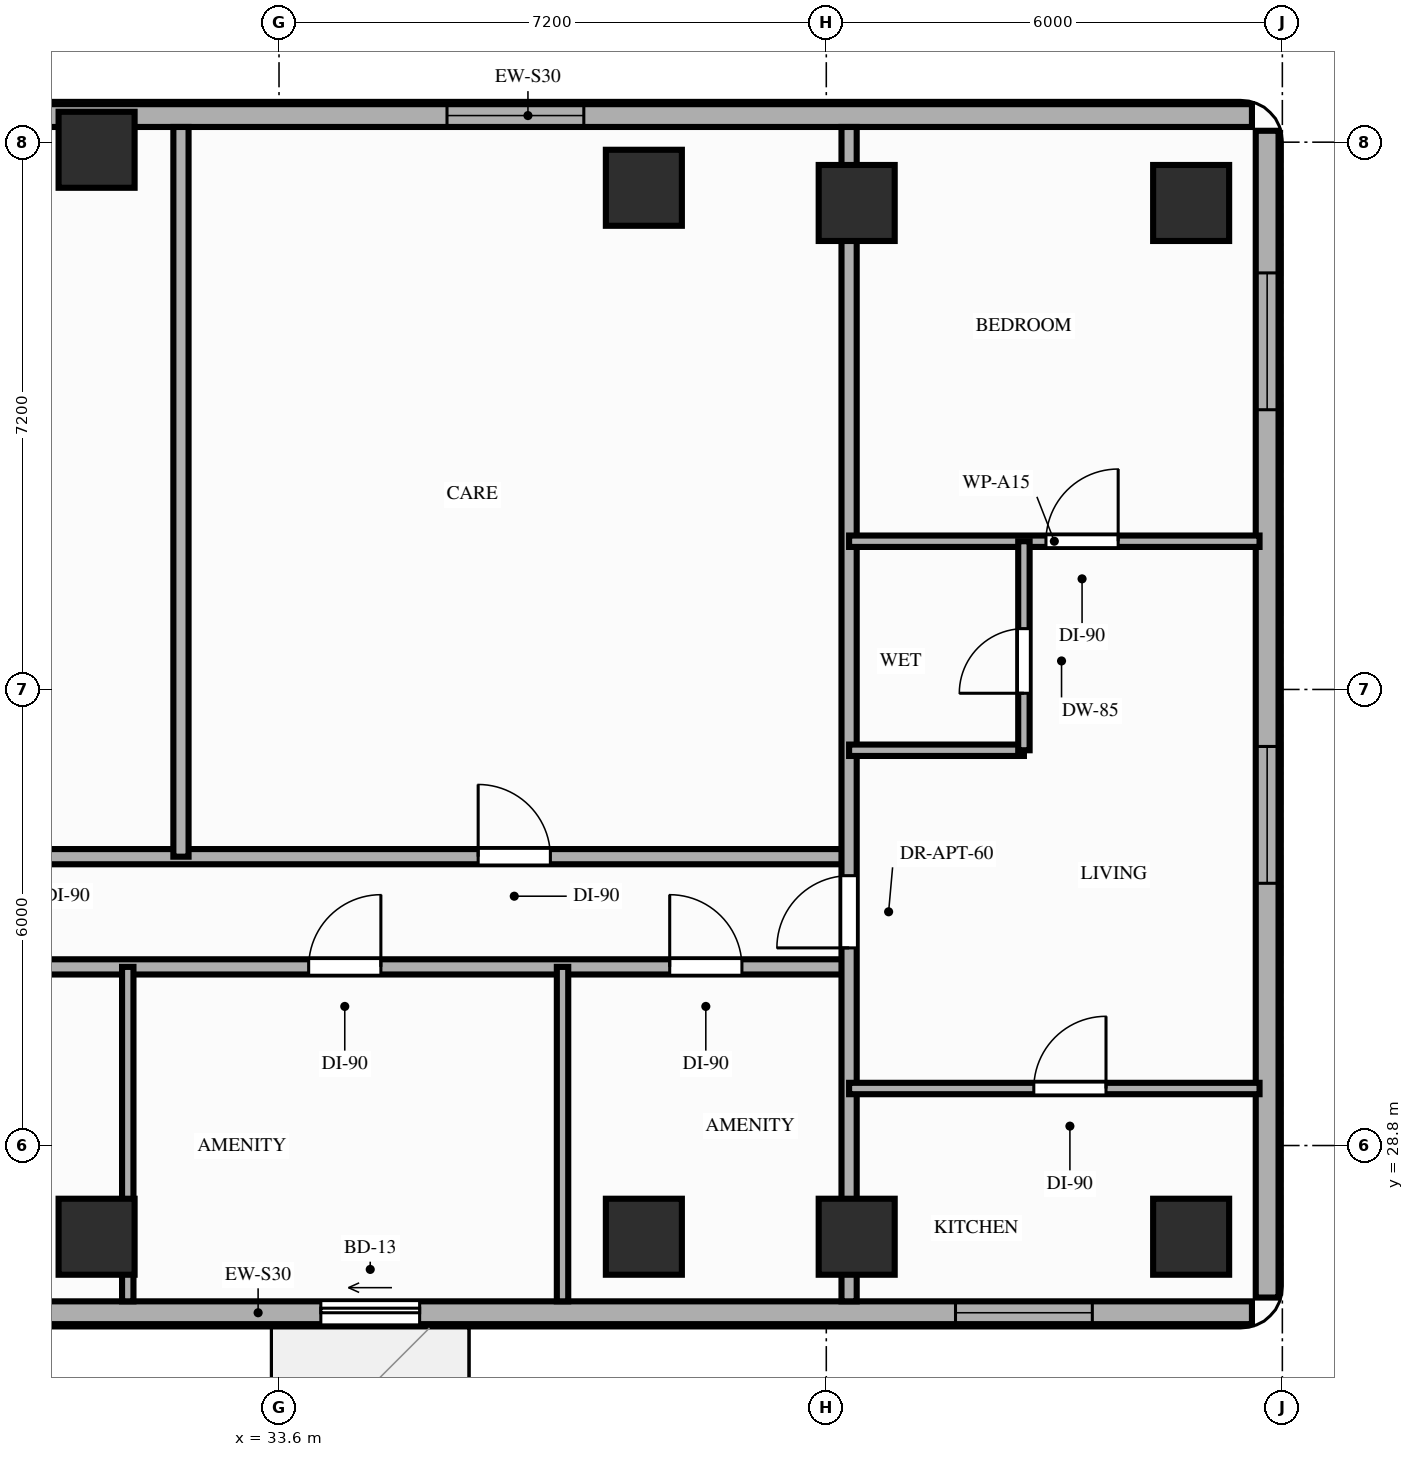
"""IFC4 building model, lengths in metres.
Left out: names, types, materials, properties, quantities, classifications, styles, units other than length and angle.
Written with IfcOpenShell. Run it as: python <this file> out.ifc"""

import sys

from ifc_helpers import new_model, si_unit, direction, frame, frame_2d, origin, origin_2d, place, context, subcontext, project, spatial, rectangle, extrude, element, fill, save


model = new_model("IFC4")
c1 = context("Model", 3, precision=1e-05, world=origin(), true_north=direction((0.0, 1.0)))
c2 = subcontext(c1, "Body", "Model", "MODEL_VIEW")
j1 = project(units=[si_unit("LENGTHUNIT", "METRE"), si_unit("PLANEANGLEUNIT", "RADIAN")], contexts=[c1])
p1 = place(None, origin())
s1 = spatial("IfcSite", under=j1, at=p1, CompositionType="ELEMENT")
p2 = place(p1, origin())
s2 = spatial("IfcBuilding", under=s1, at=p2, CompositionType="ELEMENT")
p3 = place(p2, frame((0.0, 0.0, 123.4)))
s3 = spatial("IfcBuildingStorey", under=s2, at=p3, CompositionType="ELEMENT", Elevation=123.4)
for number, where, z_axis, x_axis in (
    (1, (31.2, 27.6, 0.0), (0.0, 0.0, 1.0), (1.0, 0.0, 0.0)),
    (2, (31.2, 41.9, 0.0), (0.0, 0.0, 1.0), (1.0, 0.0, 0.0)),
    (3, (38.4, 27.6, 0.0), (0.0, 0.0, 1.0), (1.0, 0.0, 0.0)),
    (4, (38.4, 41.4, 0.0), (0.0, 0.0, 1.0), (1.0, 0.0, 0.0)),
    (5, (41.2, 27.6, 0.0), (0.0, 0.0, 1.0), (1.0, 0.0, 0.0)),
    (6, (41.2, 41.2, 0.0), (0.0, 0.0, 1.0), (1.0, 0.0, 0.0)),
    (7, (45.6, 27.6, 0.0), (0.0, 0.0, 1.0), (1.0, 0.0, 0.0)),
    (8, (45.6, 41.2, 0.0), (0.0, 0.0, 1.0), (1.0, 0.0, 0.0)),
):
    element("IfcColumn", number, at=place(p3, frame(where, z_axis=z_axis, x_axis=x_axis)), inside=s3, PredefinedType="COLUMN", context=c2, shape_type="SweptSolid", body=[
        extrude(rectangle(XDim=1.0, YDim=1.0, at=origin_2d()), origin(), (0.0, 0.0, 1.0), 3.2),
    ])
p4 = place(p3, frame((46.4, 42.35, 0.0), z_axis=(0.0, 0.0, 1.0), x_axis=(-1.0, 0.0, 0.0)))
e9 = element("IfcWall", 9, at=p4, inside=s3, PredefinedType="STANDARD", context=c2, shape_type="SweptSolid", body=[
    extrude(rectangle(XDim=19.05, YDim=0.3, at=frame_2d((9.525, 0.0))), origin(), (0.0, 0.0, 1.0), 2.45),
])
p5 = place(p4, frame((8.79, 0.0, 0.85)))
e10 = element("IfcOpeningElement", 10, at=p5, cuts=e9, PredefinedType="OPENING", context=c2, shape_type="SweptSolid", body=[
    extrude(rectangle(XDim=1.8, YDim=1.35, at=frame_2d((0.9, 0.675))), frame((0.0, 0.16, 0.0), z_axis=(0.0, -1.0, 0.0), x_axis=(1.0, 0.0, 0.0)), (0.0, 0.0, 1.0), 0.32),
])
p6 = place(p3, frame((20.25, 26.6, 0.0), z_axis=(0.0, 0.0, 1.0), x_axis=(1.0, 0.0, 0.0)))
e11 = element("IfcWall", 11, at=p6, inside=s3, PredefinedType="STANDARD", context=c2, shape_type="SweptSolid", body=[
    extrude(rectangle(XDim=26.15, YDim=0.3, at=frame_2d((13.075, 0.0))), origin(), (0.0, 0.0, 1.0), 2.71),
])
p7 = place(p6, frame((13.9, 0.0, 0.0)))
e12 = element("IfcOpeningElement", 12, at=p7, cuts=e11, PredefinedType="OPENING", context=c2, shape_type="SweptSolid", body=[
    extrude(rectangle(XDim=1.3, YDim=2.08, at=frame_2d((0.65, 1.04))), frame((0.0, 0.16, 0.0), z_axis=(0.0, -1.0, 0.0), x_axis=(1.0, 0.0, 0.0)), (0.0, 0.0, 1.0), 0.32),
])
p8 = place(p6, frame((2.25, 0.0, 0.85)))
e13 = element("IfcOpeningElement", 13, at=p8, cuts=e11, PredefinedType="OPENING", context=c2, shape_type="SweptSolid", body=[
    extrude(rectangle(XDim=1.8, YDim=1.61, at=frame_2d((0.9, 0.805))), frame((0.0, 0.16, 0.0), z_axis=(0.0, -1.0, 0.0), x_axis=(1.0, 0.0, 0.0)), (0.0, 0.0, 1.0), 0.32),
])
p9 = place(p6, frame((7.75, 0.0, 0.85)))
e14 = element("IfcOpeningElement", 14, at=p9, cuts=e11, PredefinedType="OPENING", context=c2, shape_type="SweptSolid", body=[
    extrude(rectangle(XDim=1.8, YDim=1.61, at=frame_2d((0.9, 0.805))), frame((0.0, 0.16, 0.0), z_axis=(0.0, -1.0, 0.0), x_axis=(1.0, 0.0, 0.0)), (0.0, 0.0, 1.0), 0.32),
])
p10 = place(p6, frame((22.25, 0.0, 0.85)))
e15 = element("IfcOpeningElement", 15, at=p10, cuts=e11, PredefinedType="OPENING", context=c2, shape_type="SweptSolid", body=[
    extrude(rectangle(XDim=1.8, YDim=1.61, at=frame_2d((0.9, 0.805))), frame((0.0, 0.16, 0.0), z_axis=(0.0, -1.0, 0.0), x_axis=(1.0, 0.0, 0.0)), (0.0, 0.0, 1.0), 0.32),
])
p11 = place(p3, frame((46.6, 26.8, 0.0), z_axis=(0.0, 0.0, 1.0), x_axis=(0.0, 1.0, 0.0)))
e16 = element("IfcWall", 16, at=p11, inside=s3, PredefinedType="STANDARD", context=c2, shape_type="SweptSolid", body=[
    extrude(rectangle(XDim=15.35, YDim=0.3, at=frame_2d((7.675, 0.0))), origin(), (0.0, 0.0, 1.0), 3.02),
])
p12 = place(p11, frame((5.45, 0.0, 0.85)))
e17 = element("IfcOpeningElement", 17, at=p12, cuts=e16, PredefinedType="OPENING", context=c2, shape_type="SweptSolid", body=[
    extrude(rectangle(XDim=1.8, YDim=1.75, at=frame_2d((0.9, 0.875))), frame((0.0, 0.16, 0.0), z_axis=(0.0, -1.0, 0.0), x_axis=(1.0, 0.0, 0.0)), (0.0, 0.0, 1.0), 0.32),
])
p13 = place(p11, frame((11.68, 0.0, 0.85)))
e18 = element("IfcOpeningElement", 18, at=p13, cuts=e16, PredefinedType="OPENING", context=c2, shape_type="SweptSolid", body=[
    extrude(rectangle(XDim=1.8, YDim=1.75, at=frame_2d((0.9, 0.875))), frame((0.0, 0.16, 0.0), z_axis=(0.0, -1.0, 0.0), x_axis=(1.0, 0.0, 0.0)), (0.0, 0.0, 1.0), 0.32),
])
p14 = place(p3, frame((27.15, 31.15, 0.0), z_axis=(0.0, 0.0, 1.0), x_axis=(1.0, 0.0, 0.0)))
e19 = element("IfcWall", 19, at=p14, inside=s3, PredefinedType="PARTITIONING", context=c2, shape_type="SweptSolid", body=[
    extrude(rectangle(XDim=13.95, YDim=0.2, at=frame_2d((6.975, 0.0))), origin(), (0.0, 0.0, 1.0), 2.45),
])
p15 = place(p14, frame((1.75, 0.0, 0.0)))
e20 = element("IfcOpeningElement", 20, at=p15, cuts=e19, PredefinedType="OPENING", context=c2, shape_type="SweptSolid", body=[
    extrude(rectangle(XDim=0.95, YDim=2.15, at=frame_2d((0.475, 1.075))), frame((0.0, 0.11, 0.0), z_axis=(0.0, -1.0, 0.0), x_axis=(1.0, 0.0, 0.0)), (0.0, 0.0, 1.0), 0.22),
])
p16 = place(p14, frame((6.84, 0.0, 0.0)))
e21 = element("IfcOpeningElement", 21, at=p16, cuts=e19, PredefinedType="OPENING", context=c2, shape_type="SweptSolid", body=[
    extrude(rectangle(XDim=0.95, YDim=2.15, at=frame_2d((0.475, 1.075))), frame((0.0, 0.11, 0.0), z_axis=(0.0, -1.0, 0.0), x_axis=(1.0, 0.0, 0.0)), (0.0, 0.0, 1.0), 0.22),
])
p17 = place(p14, frame((11.59, 0.0, 0.0)))
e22 = element("IfcOpeningElement", 22, at=p17, cuts=e19, PredefinedType="OPENING", context=c2, shape_type="SweptSolid", body=[
    extrude(rectangle(XDim=0.95, YDim=2.15, at=frame_2d((0.475, 1.075))), frame((0.0, 0.11, 0.0), z_axis=(0.0, -1.0, 0.0), x_axis=(1.0, 0.0, 0.0)), (0.0, 0.0, 1.0), 0.22),
])
p18 = place(p3, frame((27.15, 32.6, 0.0), z_axis=(0.0, 0.0, 1.0), x_axis=(1.0, 0.0, 0.0)))
e23 = element("IfcWall", 23, at=p18, inside=s3, PredefinedType="PARTITIONING", context=c2, shape_type="SweptSolid", body=[
    extrude(rectangle(XDim=13.95, YDim=0.2, at=frame_2d((6.975, 0.0))), origin(), (0.0, 0.0, 1.0), 2.45),
])
p19 = place(p18, frame((2.1, 0.0, 0.0)))
e24 = element("IfcOpeningElement", 24, at=p19, cuts=e23, PredefinedType="OPENING", context=c2, shape_type="SweptSolid", body=[
    extrude(rectangle(XDim=0.95, YDim=2.15, at=frame_2d((0.475, 1.075))), frame((0.0, 0.11, 0.0), z_axis=(0.0, -1.0, 0.0), x_axis=(1.0, 0.0, 0.0)), (0.0, 0.0, 1.0), 0.22),
])
p20 = place(p18, frame((9.07, 0.0, 0.0)))
e25 = element("IfcOpeningElement", 25, at=p20, cuts=e23, PredefinedType="OPENING", context=c2, shape_type="SweptSolid", body=[
    extrude(rectangle(XDim=0.95, YDim=2.15, at=frame_2d((0.475, 1.075))), frame((0.0, 0.11, 0.0), z_axis=(0.0, -1.0, 0.0), x_axis=(1.0, 0.0, 0.0)), (0.0, 0.0, 1.0), 0.22),
])
p21 = place(p3, frame((41.1, 26.75, 0.0), z_axis=(0.0, 0.0, 1.0), x_axis=(0.0, 1.0, 0.0)))
e26 = element("IfcWall", 26, at=p21, inside=s3, PredefinedType="PARTITIONING", context=c2, shape_type="SweptSolid", body=[
    extrude(rectangle(XDim=15.45, YDim=0.2, at=frame_2d((7.725, 0.0))), origin(), (0.0, 0.0, 1.0), 2.45),
])
p22 = place(p21, frame((4.65, 0.0, 0.0)))
e27 = element("IfcOpeningElement", 27, at=p22, cuts=e26, PredefinedType="OPENING", context=c2, shape_type="SweptSolid", body=[
    extrude(rectangle(XDim=0.95, YDim=2.15, at=frame_2d((0.475, 1.075))), frame((0.0, 0.11, 0.0), z_axis=(0.0, -1.0, 0.0), x_axis=(1.0, 0.0, 0.0)), (0.0, 0.0, 1.0), 0.22),
])
p23 = place(p3, frame((41.1, 29.55, 0.0), z_axis=(0.0, 0.0, 1.0), x_axis=(1.0, 0.0, 0.0)))
e28 = element("IfcWall", 28, at=p23, inside=s3, PredefinedType="PARTITIONING", context=c2, shape_type="SweptSolid", body=[
    extrude(rectangle(XDim=5.4, YDim=0.15, at=frame_2d((2.7, 0.0))), origin(), (0.0, 0.0, 1.0), 2.45),
])
p24 = place(p23, frame((2.43, 0.0, 0.0)))
e29 = element("IfcOpeningElement", 29, at=p24, cuts=e28, PredefinedType="OPENING", context=c2, shape_type="SweptSolid", body=[
    extrude(rectangle(XDim=0.95, YDim=2.15, at=frame_2d((0.475, 1.075))), frame((0.0, 0.085, 0.0), z_axis=(0.0, -1.0, 0.0), x_axis=(1.0, 0.0, 0.0)), (0.0, 0.0, 1.0), 0.17),
])
p25 = place(p3, frame((41.1, 36.75, 0.0), z_axis=(0.0, 0.0, 1.0), x_axis=(1.0, 0.0, 0.0)))
e30 = element("IfcWall", 30, at=p25, inside=s3, PredefinedType="PARTITIONING", context=c2, shape_type="SweptSolid", body=[
    extrude(rectangle(XDim=5.4, YDim=0.15, at=frame_2d((2.7, 0.0))), origin(), (0.0, 0.0, 1.0), 2.45),
])
p26 = place(p25, frame((2.59, 0.0, 0.0)))
e31 = element("IfcOpeningElement", 31, at=p26, cuts=e30, PredefinedType="OPENING", context=c2, shape_type="SweptSolid", body=[
    extrude(rectangle(XDim=0.95, YDim=2.15, at=frame_2d((0.475, 1.075))), frame((0.0, 0.085, 0.0), z_axis=(0.0, -1.0, 0.0), x_axis=(1.0, 0.0, 0.0)), (0.0, 0.0, 1.0), 0.17),
])
p27 = place(p3, frame((41.1, 34.0, 0.0), z_axis=(0.0, 0.0, 1.0), x_axis=(1.0, 0.0, 0.0)))
e32 = element("IfcWall", 32, at=p27, inside=s3, PredefinedType="PARTITIONING", context=c2, shape_type="SweptSolid", body=[
    extrude(rectangle(XDim=2.3, YDim=0.15, at=frame_2d((1.15, 0.0))), origin(), (0.0, 0.0, 1.0), 2.45),
])
p28 = place(p3, frame((43.4, 34.0, 0.0), z_axis=(0.0, 0.0, 1.0), x_axis=(0.0, 1.0, 0.0)))
e33 = element("IfcWall", 33, at=p28, inside=s3, PredefinedType="PARTITIONING", context=c2, shape_type="SweptSolid", body=[
    extrude(rectangle(XDim=2.75, YDim=0.15, at=frame_2d((1.375, 0.0))), origin(), (0.0, 0.0, 1.0), 2.6),
])
p29 = place(p28, frame((0.75, 0.0, 0.0)))
e34 = element("IfcOpeningElement", 34, at=p29, cuts=e33, PredefinedType="OPENING", context=c2, shape_type="SweptSolid", body=[
    extrude(rectangle(XDim=0.85, YDim=2.1, at=frame_2d((0.425, 1.05))), frame((0.0, 0.085, 0.0), z_axis=(0.0, -1.0, 0.0), x_axis=(1.0, 0.0, 0.0)), (0.0, 0.0, 1.0), 0.17),
])
for number, where, z_axis, x_axis in (
    (35, (31.61, 26.75, 0.0), (0.0, 0.0, 1.0), (0.0, 1.0, 0.0)),
    (36, (37.33, 26.75, 0.0), (0.0, 0.0, 1.0), (0.0, 1.0, 0.0)),
):
    element("IfcWall", number, at=place(p3, frame(where, z_axis=z_axis, x_axis=x_axis)), inside=s3, PredefinedType="PARTITIONING", context=c2, shape_type="SweptSolid", body=[
        extrude(rectangle(XDim=4.4, YDim=0.15, at=frame_2d((2.2, 0.0))), origin(), (0.0, 0.0, 1.0), 2.45),
    ])
p30 = place(p3, frame((32.31, 32.6, 0.0), z_axis=(0.0, 0.0, 1.0), x_axis=(0.0, 1.0, 0.0)))
e37 = element("IfcWall", 37, at=p30, inside=s3, PredefinedType="PARTITIONING", context=c2, shape_type="SweptSolid", body=[
    extrude(rectangle(XDim=9.6, YDim=0.2, at=frame_2d((4.8, 0.0))), origin(), (0.0, 0.0, 1.0), 2.45),
])
p31 = place(p7, origin())
e38 = element("IfcDoor", 38, at=p31, inside=s3, OperationType="SLIDING_TO_LEFT", PredefinedType="DOOR", context=c2, shape_type="SweptSolid", body=[
    extrude(rectangle(XDim=1.3, YDim=2.08, at=frame_2d((0.65, 1.04))), frame((0.0, 0.025, 0.0), z_axis=(0.0, -1.0, 0.0), x_axis=(1.0, 0.0, 0.0)), (0.0, 0.0, 1.0), 0.05),
])
fill(e12, e38)
p32 = place(p12, origin())
e39 = element("IfcWindow", 39, at=p32, inside=s3, PartitioningType="SINGLE_PANEL", PredefinedType="WINDOW", context=c2, shape_type="SweptSolid", body=[
    extrude(rectangle(XDim=1.8, YDim=1.75, at=frame_2d((0.9, 0.875))), frame((0.0, 0.03, 0.0), z_axis=(0.0, -1.0, 0.0), x_axis=(1.0, 0.0, 0.0)), (0.0, 0.0, 1.0), 0.06),
])
fill(e17, e39)
p33 = place(p13, origin())
e40 = element("IfcWindow", 40, at=p33, inside=s3, PartitioningType="SINGLE_PANEL", PredefinedType="WINDOW", context=c2, shape_type="SweptSolid", body=[
    extrude(rectangle(XDim=1.8, YDim=1.75, at=frame_2d((0.9, 0.875))), frame((0.0, 0.03, 0.0), z_axis=(0.0, -1.0, 0.0), x_axis=(1.0, 0.0, 0.0)), (0.0, 0.0, 1.0), 0.06),
])
fill(e18, e40)
p34 = place(p5, origin())
e41 = element("IfcWindow", 41, at=p34, inside=s3, PartitioningType="SINGLE_PANEL", PredefinedType="WINDOW", context=c2, shape_type="SweptSolid", body=[
    extrude(rectangle(XDim=1.8, YDim=1.35, at=frame_2d((0.9, 0.675))), frame((0.0, 0.03, 0.0), z_axis=(0.0, -1.0, 0.0), x_axis=(1.0, 0.0, 0.0)), (0.0, 0.0, 1.0), 0.06),
])
fill(e10, e41)
p35 = place(p10, origin())
e42 = element("IfcWindow", 42, at=p35, inside=s3, PartitioningType="SINGLE_PANEL", PredefinedType="WINDOW", context=c2, shape_type="SweptSolid", body=[
    extrude(rectangle(XDim=1.8, YDim=1.61, at=frame_2d((0.9, 0.805))), frame((0.0, 0.03, 0.0), z_axis=(0.0, -1.0, 0.0), x_axis=(1.0, 0.0, 0.0)), (0.0, 0.0, 1.0), 0.06),
])
fill(e15, e42)
p36 = place(p22, origin())
e43 = element("IfcDoor", 43, at=p36, inside=s3, OperationType="SINGLE_SWING_LEFT", PredefinedType="DOOR", context=c2, shape_type="SweptSolid", body=[
    extrude(rectangle(XDim=0.95, YDim=2.15, at=frame_2d((0.475, 1.075))), frame((0.0, 0.025, 0.0), z_axis=(0.0, -1.0, 0.0), x_axis=(1.0, 0.0, 0.0)), (0.0, 0.0, 1.0), 0.05),
])
fill(e27, e43)
p37 = place(p26, origin())
e44 = element("IfcDoor", 44, at=p37, inside=s3, OperationType="SINGLE_SWING_RIGHT", PredefinedType="DOOR", context=c2, shape_type="SweptSolid", body=[
    extrude(rectangle(XDim=0.95, YDim=2.15, at=frame_2d((0.475, 1.075))), frame((0.0, 0.025, 0.0), z_axis=(0.0, -1.0, 0.0), x_axis=(1.0, 0.0, 0.0)), (0.0, 0.0, 1.0), 0.05),
])
fill(e31, e44)
p38 = place(p29, origin())
e45 = element("IfcDoor", 45, at=p38, inside=s3, OperationType="SINGLE_SWING_LEFT", PredefinedType="DOOR", context=c2, shape_type="SweptSolid", body=[
    extrude(rectangle(XDim=0.85, YDim=2.1, at=frame_2d((0.425, 1.05))), frame((0.0, 0.025, 0.0), z_axis=(0.0, -1.0, 0.0), x_axis=(1.0, 0.0, 0.0)), (0.0, 0.0, 1.0), 0.05),
])
fill(e34, e45)
p39 = place(p24, origin())
e46 = element("IfcDoor", 46, at=p39, inside=s3, OperationType="SINGLE_SWING_RIGHT", PredefinedType="DOOR", context=c2, shape_type="SweptSolid", body=[
    extrude(rectangle(XDim=0.95, YDim=2.15, at=frame_2d((0.475, 1.075))), frame((0.0, 0.025, 0.0), z_axis=(0.0, -1.0, 0.0), x_axis=(1.0, 0.0, 0.0)), (0.0, 0.0, 1.0), 0.05),
])
fill(e29, e46)
p40 = place(p16, origin())
e47 = element("IfcDoor", 47, at=p40, inside=s3, OperationType="SINGLE_SWING_RIGHT", PredefinedType="DOOR", context=c2, shape_type="SweptSolid", body=[
    extrude(rectangle(XDim=0.95, YDim=2.15, at=frame_2d((0.475, 1.075))), frame((0.0, 0.025, 0.0), z_axis=(0.0, -1.0, 0.0), x_axis=(1.0, 0.0, 0.0)), (0.0, 0.0, 1.0), 0.05),
])
fill(e21, e47)
p41 = place(p17, origin())
e48 = element("IfcDoor", 48, at=p41, inside=s3, OperationType="SINGLE_SWING_LEFT", PredefinedType="DOOR", context=c2, shape_type="SweptSolid", body=[
    extrude(rectangle(XDim=0.95, YDim=2.15, at=frame_2d((0.475, 1.075))), frame((0.0, 0.025, 0.0), z_axis=(0.0, -1.0, 0.0), x_axis=(1.0, 0.0, 0.0)), (0.0, 0.0, 1.0), 0.05),
])
fill(e22, e48)
p42 = place(p20, origin())
e49 = element("IfcDoor", 49, at=p42, inside=s3, OperationType="SINGLE_SWING_LEFT", PredefinedType="DOOR", context=c2, shape_type="SweptSolid", body=[
    extrude(rectangle(XDim=0.95, YDim=2.15, at=frame_2d((0.475, 1.075))), frame((0.0, 0.025, 0.0), z_axis=(0.0, -1.0, 0.0), x_axis=(1.0, 0.0, 0.0)), (0.0, 0.0, 1.0), 0.05),
])
fill(e25, e49)
save(model, sys.argv[1])
